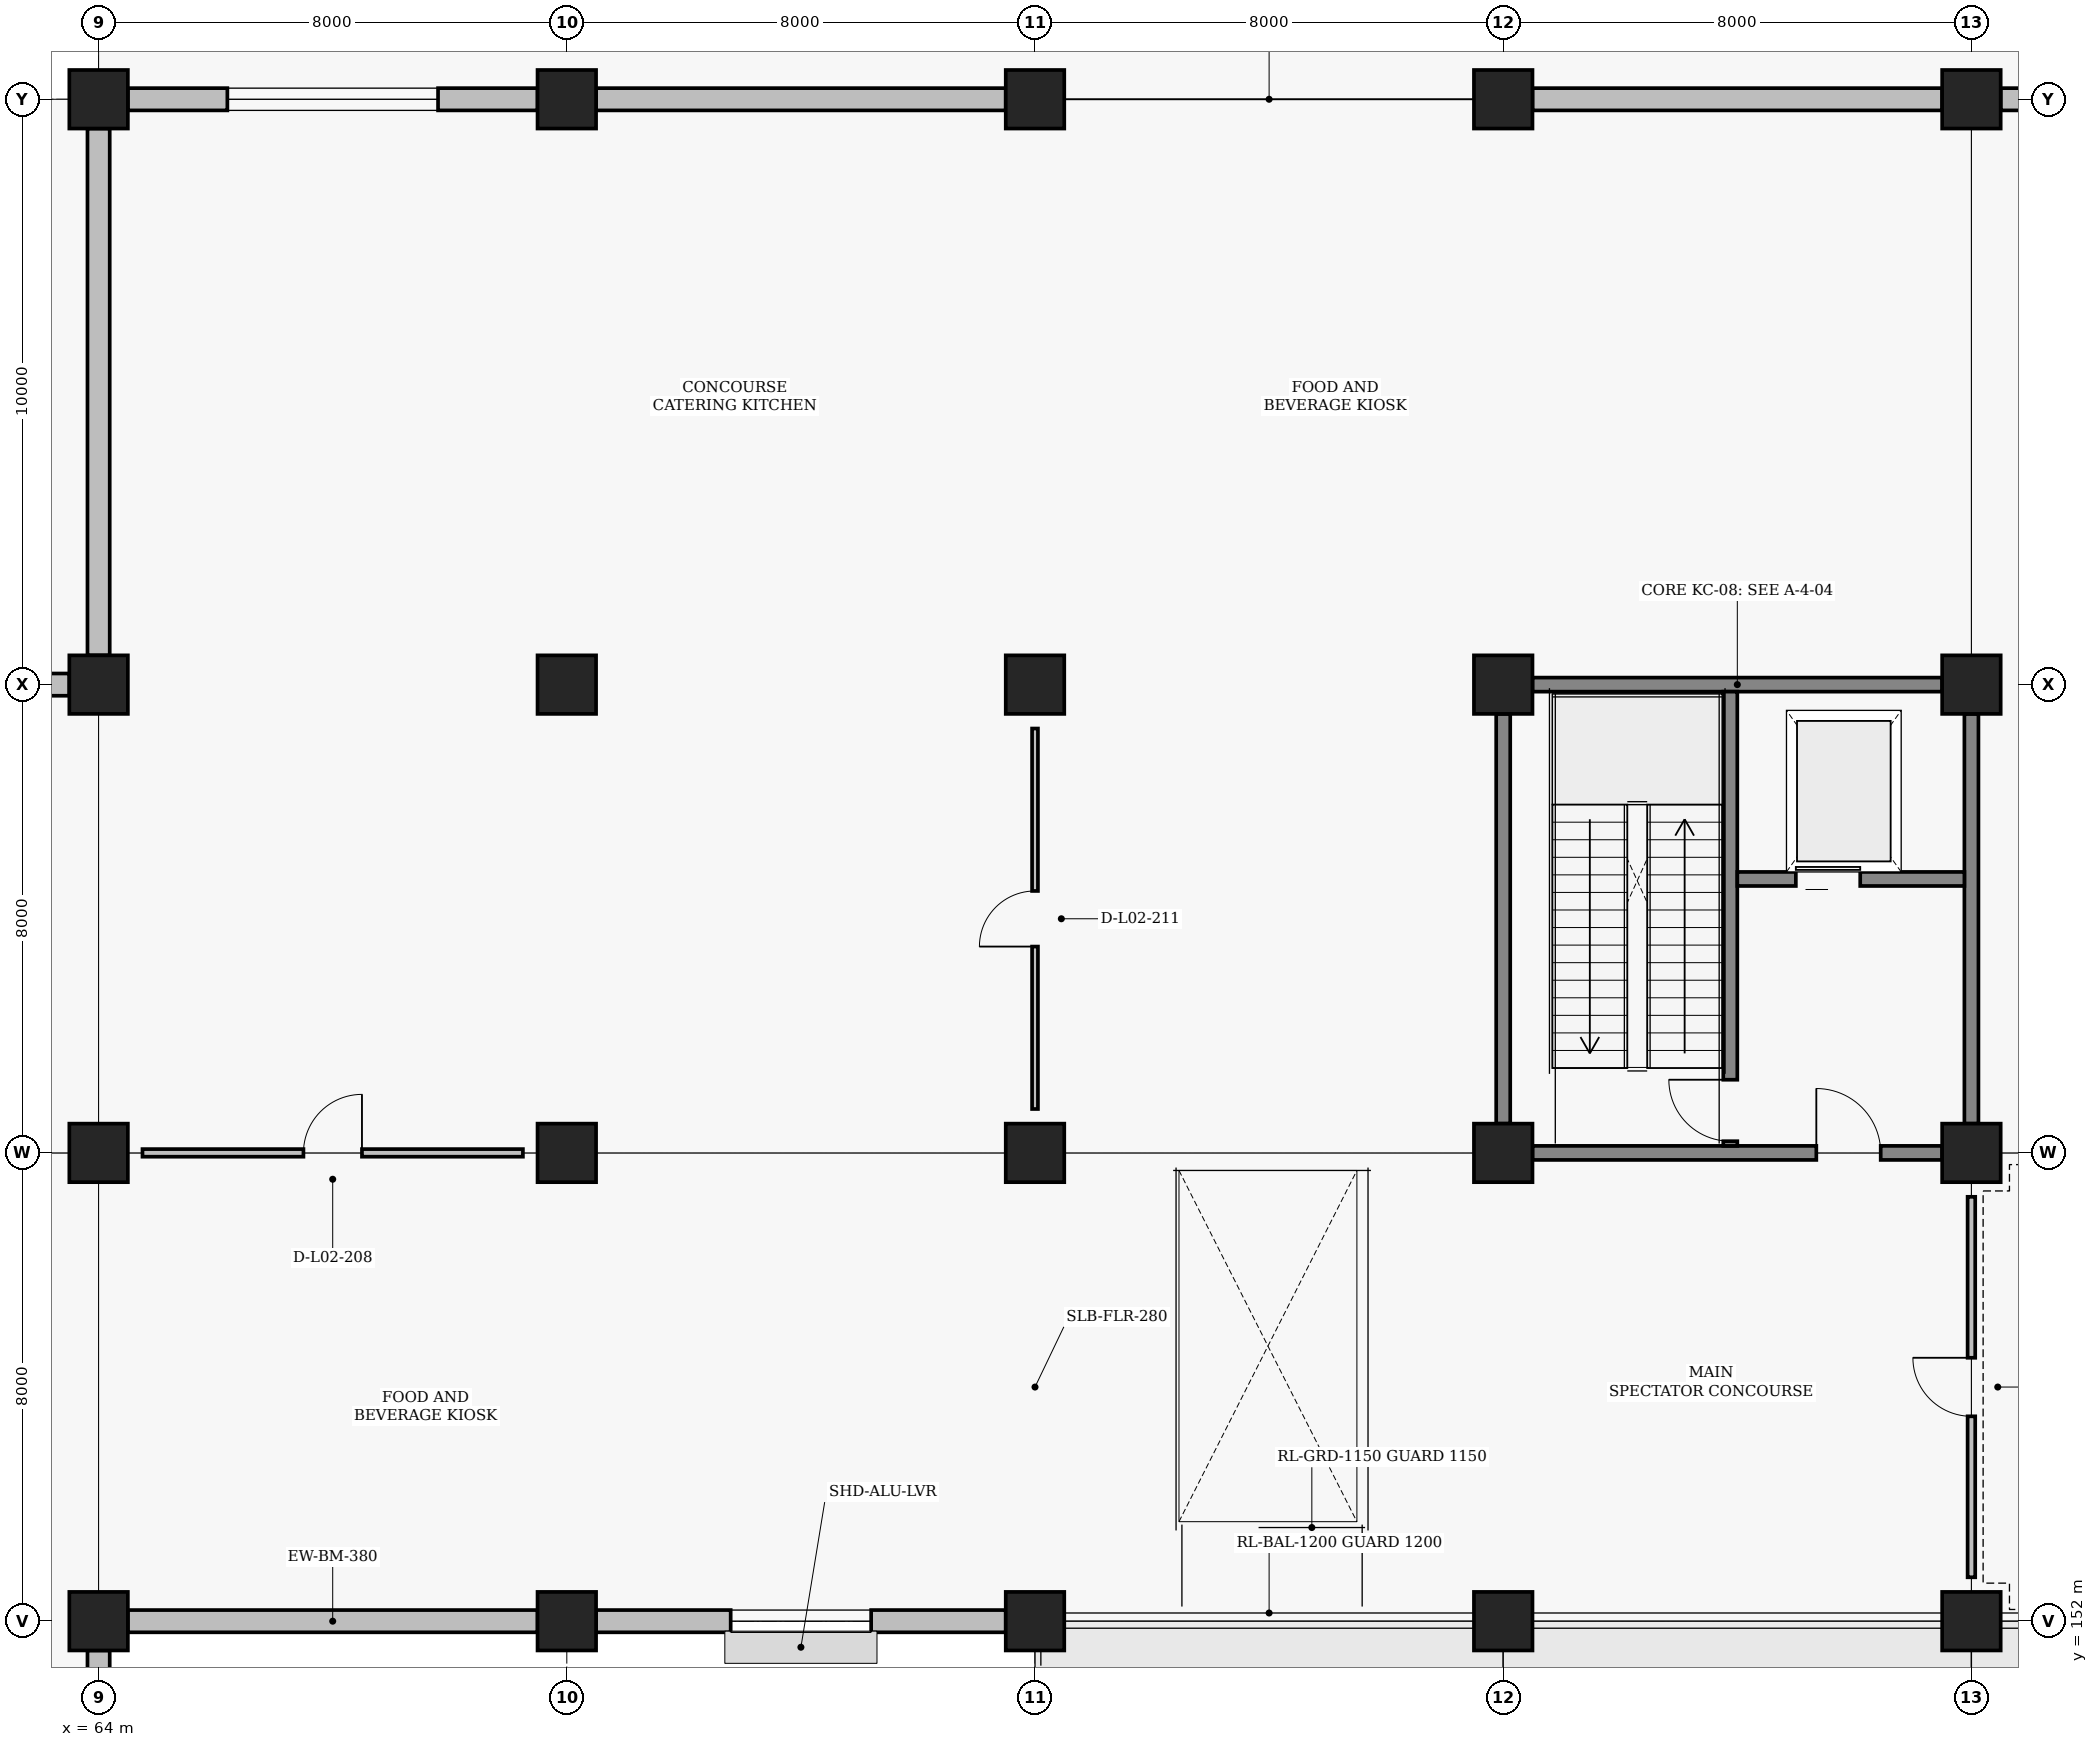
"""IFC4 building model, lengths in metres.
Left out: names, types, materials, properties, quantities, classifications, styles, units other than length and angle.
Written with IfcOpenShell. Run it as: python <this file> out.ifc"""

import sys

from ifc_helpers import new_model, si_unit, direction, frame, frame_2d, origin, origin_2d, place, context, subcontext, project, spatial, rectangle, extrude, element, fill, save


model = new_model("IFC4")
c1 = context("Model", 3, precision=1e-05, world=origin(), true_north=direction((0.0, 1.0)))
c2 = subcontext(c1, "Body", "Model", "MODEL_VIEW")
j1 = project(units=[si_unit("LENGTHUNIT", "METRE"), si_unit("PLANEANGLEUNIT", "RADIAN")], contexts=[c1])
p1 = place(None, origin())
s1 = spatial("IfcSite", under=j1, at=p1, CompositionType="ELEMENT")
p2 = place(p1, origin())
s2 = spatial("IfcBuilding", under=s1, at=p2, CompositionType="ELEMENT")
p3 = place(p2, frame((0.0, 0.0, 4.8)))
s3 = spatial("IfcBuildingStorey", under=s2, at=p3, CompositionType="ELEMENT", Elevation=4.8)
for number, where, z_axis, x_axis in (
    (1, (64.0, 152.0, 0.0), (0.0, 0.0, 1.0), (1.0, 0.0, 0.0)),
    (2, (64.0, 160.0, 0.0), (0.0, 0.0, 1.0), (1.0, 0.0, 0.0)),
    (3, (64.0, 168.0, 0.0), (0.0, 0.0, 1.0), (1.0, 0.0, 0.0)),
    (4, (64.0, 178.0, 0.0), (0.0, 0.0, 1.0), (1.0, 0.0, 0.0)),
    (5, (72.0, 152.0, 0.0), (0.0, 0.0, 1.0), (1.0, 0.0, 0.0)),
    (6, (72.0, 160.0, 0.0), (0.0, 0.0, 1.0), (1.0, 0.0, 0.0)),
    (7, (72.0, 168.0, 0.0), (0.0, 0.0, 1.0), (1.0, 0.0, 0.0)),
    (8, (72.0, 178.0, 0.0), (0.0, 0.0, 1.0), (1.0, 0.0, 0.0)),
    (9, (80.0, 152.0, 0.0), (0.0, 0.0, 1.0), (1.0, 0.0, 0.0)),
    (10, (80.0, 160.0, 0.0), (0.0, 0.0, 1.0), (1.0, 0.0, 0.0)),
    (11, (80.0, 168.0, 0.0), (0.0, 0.0, 1.0), (1.0, 0.0, 0.0)),
    (12, (80.0, 178.0, 0.0), (0.0, 0.0, 1.0), (1.0, 0.0, 0.0)),
    (13, (88.0, 152.0, 0.0), (0.0, 0.0, 1.0), (1.0, 0.0, 0.0)),
    (14, (88.0, 160.0, 0.0), (0.0, 0.0, 1.0), (1.0, 0.0, 0.0)),
    (15, (88.0, 168.0, 0.0), (0.0, 0.0, 1.0), (1.0, 0.0, 0.0)),
    (16, (88.0, 178.0, 0.0), (0.0, 0.0, 1.0), (1.0, 0.0, 0.0)),
    (17, (96.0, 152.0, 0.0), (0.0, 0.0, 1.0), (1.0, 0.0, 0.0)),
    (18, (96.0, 160.0, 0.0), (0.0, 0.0, 1.0), (1.0, 0.0, 0.0)),
    (19, (96.0, 168.0, 0.0), (0.0, 0.0, 1.0), (1.0, 0.0, 0.0)),
    (20, (96.0, 178.0, 0.0), (0.0, 0.0, 1.0), (1.0, 0.0, 0.0)),
):
    element("IfcColumn", number, at=place(p3, frame(where, z_axis=z_axis, x_axis=x_axis)), inside=s3, PredefinedType="COLUMN", context=c2, shape_type="SweptSolid", body=[
        extrude(rectangle(XDim=1.0, YDim=1.0, at=origin_2d()), origin(), (0.0, 0.0, 1.0), 4.8),
    ])
p4 = place(p3, frame((64.0, 144.5, 0.0), z_axis=(0.0, 0.0, 1.0), x_axis=(0.0, 1.0, 0.0)))
e21 = element("IfcWall", 21, at=p4, inside=s3, PredefinedType="SOLIDWALL", context=c2, shape_type="SweptSolid", body=[
    extrude(rectangle(XDim=7.0, YDim=0.38, at=frame_2d((3.5, 0.0))), origin(), (0.0, 0.0, 1.0), 3.91),
])
p5 = place(p4, frame((1.925, 0.0, 0.95)))
e22 = element("IfcOpeningElement", 22, at=p5, cuts=e21, PredefinedType="OPENING", context=c2, shape_type="SweptSolid", body=[
    extrude(rectangle(XDim=3.15, YDim=2.15, at=frame_2d((1.575, 1.075))), frame((0.0, 0.2, 0.0), z_axis=(0.0, -1.0, 0.0), x_axis=(1.0, 0.0, 0.0)), (0.0, 0.0, 1.0), 0.4),
])
p6 = place(p3, frame((56.5, 168.0, 0.0), z_axis=(0.0, 0.0, 1.0), x_axis=(1.0, 0.0, 0.0)))
e23 = element("IfcWall", 23, at=p6, inside=s3, PredefinedType="SOLIDWALL", context=c2, shape_type="SweptSolid", body=[
    extrude(rectangle(XDim=7.0, YDim=0.38, at=frame_2d((3.5, 0.0))), origin(), (0.0, 0.0, 1.0), 3.91),
])
p7 = place(p6, frame((1.85, 0.0, 0.95)))
e24 = element("IfcOpeningElement", 24, at=p7, cuts=e23, PredefinedType="OPENING", context=c2, shape_type="SweptSolid", body=[
    extrude(rectangle(XDim=3.3, YDim=2.2, at=frame_2d((1.65, 1.1))), frame((0.0, 0.2, 0.0), z_axis=(0.0, -1.0, 0.0), x_axis=(1.0, 0.0, 0.0)), (0.0, 0.0, 1.0), 0.4),
])
p8 = place(p3, frame((64.5, 152.0, 0.0), z_axis=(0.0, 0.0, 1.0), x_axis=(1.0, 0.0, 0.0)))
e25 = element("IfcWall", 25, at=p8, inside=s3, PredefinedType="SOLIDWALL", context=c2, shape_type="SweptSolid", body=[
    extrude(rectangle(XDim=7.0, YDim=0.38, at=frame_2d((3.5, 0.0))), origin(), (0.0, 0.0, 1.0), 3.91),
])
p9 = place(p3, frame((64.5, 178.0, 0.0), z_axis=(0.0, 0.0, 1.0), x_axis=(1.0, 0.0, 0.0)))
e26 = element("IfcWall", 26, at=p9, inside=s3, PredefinedType="SOLIDWALL", context=c2, shape_type="SweptSolid", body=[
    extrude(rectangle(XDim=7.0, YDim=0.38, at=frame_2d((3.5, 0.0))), origin(), (0.0, 0.0, 1.0), 3.77),
])
p10 = place(p9, frame((1.7, 0.0, 0.95)))
e27 = element("IfcOpeningElement", 27, at=p10, cuts=e26, PredefinedType="OPENING", context=c2, shape_type="SweptSolid", body=[
    extrude(rectangle(XDim=3.6, YDim=2.2, at=frame_2d((1.8, 1.1))), frame((0.0, 0.2, 0.0), z_axis=(0.0, -1.0, 0.0), x_axis=(1.0, 0.0, 0.0)), (0.0, 0.0, 1.0), 0.4),
])
p11 = place(p3, frame((64.0, 168.5, 0.0), z_axis=(0.0, 0.0, 1.0), x_axis=(0.0, 1.0, 0.0)))
e28 = element("IfcWall", 28, at=p11, inside=s3, PredefinedType="SOLIDWALL", context=c2, shape_type="SweptSolid", body=[
    extrude(rectangle(XDim=9.0, YDim=0.38, at=frame_2d((4.5, 0.0))), origin(), (0.0, 0.0, 1.0), 3.91),
])
p12 = place(p3, frame((72.5, 152.0, 0.0), z_axis=(0.0, 0.0, 1.0), x_axis=(1.0, 0.0, 0.0)))
e29 = element("IfcWall", 29, at=p12, inside=s3, PredefinedType="SOLIDWALL", context=c2, shape_type="SweptSolid", body=[
    extrude(rectangle(XDim=7.0, YDim=0.38, at=frame_2d((3.5, 0.0))), origin(), (0.0, 0.0, 1.0), 3.91),
])
p13 = place(p12, frame((2.3, 0.0, 1.9)))
e30 = element("IfcOpeningElement", 30, at=p13, cuts=e29, PredefinedType="OPENING", context=c2, shape_type="SweptSolid", body=[
    extrude(rectangle(XDim=2.4, YDim=1.1, at=frame_2d((1.2, 0.55))), frame((0.0, 0.2, 0.0), z_axis=(0.0, -1.0, 0.0), x_axis=(1.0, 0.0, 0.0)), (0.0, 0.0, 1.0), 0.4),
])
for number, where, z_axis, x_axis in (
    (31, (72.5, 178.0, 0.0), (0.0, 0.0, 1.0), (1.0, 0.0, 0.0)),
    (32, (88.5, 178.0, 0.0), (0.0, 0.0, 1.0), (1.0, 0.0, 0.0)),
):
    element("IfcWall", number, at=place(p3, frame(where, z_axis=z_axis, x_axis=x_axis)), inside=s3, PredefinedType="SOLIDWALL", context=c2, shape_type="SweptSolid", body=[
        extrude(rectangle(XDim=7.0, YDim=0.38, at=frame_2d((3.5, 0.0))), origin(), (0.0, 0.0, 1.0), 3.77),
    ])
p14 = place(p3, frame((96.5, 178.0, 0.0), z_axis=(0.0, 0.0, 1.0), x_axis=(1.0, 0.0, 0.0)))
e33 = element("IfcWall", 33, at=p14, inside=s3, PredefinedType="SOLIDWALL", context=c2, shape_type="SweptSolid", body=[
    extrude(rectangle(XDim=7.0, YDim=0.38, at=frame_2d((3.5, 0.0))), origin(), (0.0, 0.0, 1.0), 3.77),
])
p15 = place(p14, frame((1.9, 0.0, 1.9)))
e34 = element("IfcOpeningElement", 34, at=p15, cuts=e33, PredefinedType="OPENING", context=c2, shape_type="SweptSolid", body=[
    extrude(rectangle(XDim=3.2, YDim=1.1, at=frame_2d((1.6, 0.55))), frame((0.0, 0.2, 0.0), z_axis=(0.0, -1.0, 0.0), x_axis=(1.0, 0.0, 0.0)), (0.0, 0.0, 1.0), 0.4),
])
p16 = place(p3, frame((88.5, 160.0, 0.0), z_axis=(0.0, 0.0, 1.0), x_axis=(1.0, 0.0, 0.0)))
e35 = element("IfcWall", 35, at=p16, inside=s3, PredefinedType="SHEAR", context=c2, shape_type="SweptSolid", body=[
    extrude(rectangle(XDim=7.0, YDim=0.24, at=frame_2d((3.5, 0.0))), origin(), (0.0, 0.0, 1.0), 3.61),
])
p17 = place(p16, frame((4.85, 0.0, 0.0)))
e36 = element("IfcOpeningElement", 36, at=p17, cuts=e35, PredefinedType="OPENING", context=c2, shape_type="SweptSolid", body=[
    extrude(rectangle(XDim=1.1, YDim=2.2, at=frame_2d((0.55, 1.1))), frame((0.0, 0.13, 0.0), z_axis=(0.0, -1.0, 0.0), x_axis=(1.0, 0.0, 0.0)), (0.0, 0.0, 1.0), 0.26),
])
p18 = place(p3, frame((88.5, 168.0, 0.0), z_axis=(0.0, 0.0, 1.0), x_axis=(1.0, 0.0, 0.0)))
e37 = element("IfcWall", 37, at=p18, inside=s3, PredefinedType="SHEAR", context=c2, shape_type="SweptSolid", body=[
    extrude(rectangle(XDim=7.0, YDim=0.24, at=frame_2d((3.5, 0.0))), origin(), (0.0, 0.0, 1.0), 3.77),
])
p19 = place(p3, frame((88.0, 160.5, 0.0), z_axis=(0.0, 0.0, 1.0), x_axis=(0.0, 1.0, 0.0)))
e38 = element("IfcWall", 38, at=p19, inside=s3, PredefinedType="SHEAR", context=c2, shape_type="SweptSolid", body=[
    extrude(rectangle(XDim=7.0, YDim=0.24, at=frame_2d((3.5, 0.0))), origin(), (0.0, 0.0, 1.0), 3.61),
])
p20 = place(p3, frame((96.0, 160.5, 0.0), z_axis=(0.0, 0.0, 1.0), x_axis=(0.0, 1.0, 0.0)))
e39 = element("IfcWall", 39, at=p20, inside=s3, PredefinedType="SHEAR", context=c2, shape_type="SweptSolid", body=[
    extrude(rectangle(XDim=7.0, YDim=0.24, at=frame_2d((3.5, 0.0))), origin(), (0.0, 0.0, 1.0), 3.77),
])
p21 = place(p3, frame((91.88, 160.12, 0.0), z_axis=(0.0, 0.0, 1.0), x_axis=(0.0, 1.0, 0.0)))
e40 = element("IfcWall", 40, at=p21, inside=s3, PredefinedType="SHEAR", context=c2, shape_type="SweptSolid", body=[
    extrude(rectangle(XDim=7.76, YDim=0.24, at=frame_2d((3.88, 0.0))), origin(), (0.0, 0.0, 1.0), 4.01),
])
p22 = place(p21, frame((0.08, 0.0, 0.0)))
e41 = element("IfcOpeningElement", 41, at=p22, cuts=e40, PredefinedType="OPENING", context=c2, shape_type="SweptSolid", body=[
    extrude(rectangle(XDim=1.05, YDim=2.15, at=frame_2d((0.525, 1.075))), frame((0.0, 0.13, 0.0), z_axis=(0.0, -1.0, 0.0), x_axis=(1.0, 0.0, 0.0)), (0.0, 0.0, 1.0), 0.26),
])
p23 = place(p3, frame((92.0, 164.68, 0.0), z_axis=(0.0, 0.0, 1.0), x_axis=(1.0, 0.0, 0.0)))
e42 = element("IfcWall", 42, at=p23, inside=s3, PredefinedType="SHEAR", context=c2, shape_type="SweptSolid", body=[
    extrude(rectangle(XDim=3.88, YDim=0.24, at=frame_2d((1.94, 0.0))), origin(), (0.0, 0.0, 1.0), 3.91),
])
p24 = place(p23, frame((1.0, 0.0, 0.0)))
e43 = element("IfcOpeningElement", 43, at=p24, cuts=e42, PredefinedType="OPENING", context=c2, shape_type="SweptSolid", body=[
    extrude(rectangle(XDim=1.1, YDim=2.15, at=frame_2d((0.55, 1.075))), frame((0.0, 0.13, 0.0), z_axis=(0.0, -1.0, 0.0), x_axis=(1.0, 0.0, 0.0)), (0.0, 0.0, 1.0), 0.26),
])
p25 = place(p3, frame((64.75, 160.0, 0.0), z_axis=(0.0, 0.0, 1.0), x_axis=(1.0, 0.0, 0.0)))
e44 = element("IfcWall", 44, at=p25, inside=s3, PredefinedType="PARTITIONING", context=c2, shape_type="SweptSolid", body=[
    extrude(rectangle(XDim=6.5, YDim=0.13, at=frame_2d((3.25, 0.0))), origin(), (0.0, 0.0, 1.0), 3.91),
])
p26 = place(p25, frame((2.75, 0.0, 0.0)))
e45 = element("IfcOpeningElement", 45, at=p26, cuts=e44, PredefinedType="OPENING", context=c2, shape_type="SweptSolid", body=[
    extrude(rectangle(XDim=1.0, YDim=2.1, at=frame_2d((0.5, 1.05))), frame((0.0, 0.075, 0.0), z_axis=(0.0, -1.0, 0.0), x_axis=(1.0, 0.0, 0.0)), (0.0, 0.0, 1.0), 0.15),
])
p27 = place(p3, frame((80.0, 160.75, 0.0), z_axis=(0.0, 0.0, 1.0), x_axis=(0.0, 1.0, 0.0)))
e46 = element("IfcWall", 46, at=p27, inside=s3, PredefinedType="PARTITIONING", context=c2, shape_type="SweptSolid", body=[
    extrude(rectangle(XDim=6.5, YDim=0.1, at=frame_2d((3.25, 0.0))), origin(), (0.0, 0.0, 1.0), 3.91),
])
p28 = place(p27, frame((2.775, 0.0, 0.0)))
e47 = element("IfcOpeningElement", 47, at=p28, cuts=e46, PredefinedType="OPENING", context=c2, shape_type="SweptSolid", body=[
    extrude(rectangle(XDim=0.95, YDim=2.1, at=frame_2d((0.475, 1.05))), frame((0.0, 0.06, 0.0), z_axis=(0.0, -1.0, 0.0), x_axis=(1.0, 0.0, 0.0)), (0.0, 0.0, 1.0), 0.12),
])
p29 = place(p3, frame((96.0, 152.75, 0.0), z_axis=(0.0, 0.0, 1.0), x_axis=(0.0, 1.0, 0.0)))
e48 = element("IfcWall", 48, at=p29, inside=s3, PredefinedType="PARTITIONING", context=c2, shape_type="SweptSolid", body=[
    extrude(rectangle(XDim=6.5, YDim=0.13, at=frame_2d((3.25, 0.0))), origin(), (0.0, 0.0, 1.0), 3.91),
])
p30 = place(p29, frame((2.75, 0.0, 0.0)))
e49 = element("IfcOpeningElement", 49, at=p30, cuts=e48, PredefinedType="OPENING", context=c2, shape_type="SweptSolid", body=[
    extrude(rectangle(XDim=1.0, YDim=2.1, at=frame_2d((0.5, 1.05))), frame((0.0, 0.075, 0.0), z_axis=(0.0, -1.0, 0.0), x_axis=(1.0, 0.0, 0.0)), (0.0, 0.0, 1.0), 0.15),
])
p31 = place(p10, origin())
e50 = element("IfcWindow", 50, at=p31, inside=s3, PartitioningType="SINGLE_PANEL", PredefinedType="WINDOW", context=c2, shape_type="SweptSolid", body=[
    extrude(rectangle(XDim=3.6, YDim=2.2, at=frame_2d((1.8, 1.1))), frame((0.0, 0.03, 0.0), z_axis=(0.0, -1.0, 0.0), x_axis=(1.0, 0.0, 0.0)), (0.0, 0.0, 1.0), 0.06),
])
fill(e27, e50)
p32 = place(p13, origin())
e51 = element("IfcWindow", 51, at=p32, inside=s3, PartitioningType="SINGLE_PANEL", PredefinedType="LIGHTDOME", context=c2, shape_type="SweptSolid", body=[
    extrude(rectangle(XDim=2.4, YDim=1.1, at=frame_2d((1.2, 0.55))), frame((0.0, 0.03, 0.0), z_axis=(0.0, -1.0, 0.0), x_axis=(1.0, 0.0, 0.0)), (0.0, 0.0, 1.0), 0.06),
])
fill(e30, e51)
p33 = place(p17, origin())
e52 = element("IfcDoor", 52, at=p33, inside=s3, OperationType="SINGLE_SWING_LEFT", PredefinedType="DOOR", context=c2, shape_type="SweptSolid", body=[
    extrude(rectangle(XDim=1.1, YDim=2.2, at=frame_2d((0.55, 1.1))), frame((0.0, 0.025, 0.0), z_axis=(0.0, -1.0, 0.0), x_axis=(1.0, 0.0, 0.0)), (0.0, 0.0, 1.0), 0.05),
])
fill(e36, e52)
p34 = place(p22, origin())
e53 = element("IfcDoor", 53, at=p34, inside=s3, OperationType="SINGLE_SWING_RIGHT", PredefinedType="DOOR", context=c2, shape_type="SweptSolid", body=[
    extrude(rectangle(XDim=1.05, YDim=2.15, at=frame_2d((0.525, 1.075))), frame((0.0, 0.025, 0.0), z_axis=(0.0, -1.0, 0.0), x_axis=(1.0, 0.0, 0.0)), (0.0, 0.0, 1.0), 0.05),
])
fill(e41, e53)
p35 = place(p24, origin())
e54 = element("IfcDoor", 54, at=p35, inside=s3, OperationType="SLIDING_TO_LEFT", PredefinedType="DOOR", context=c2, shape_type="SweptSolid", body=[
    extrude(rectangle(XDim=1.1, YDim=2.15, at=frame_2d((0.55, 1.075))), frame((0.0, 0.025, 0.0), z_axis=(0.0, -1.0, 0.0), x_axis=(1.0, 0.0, 0.0)), (0.0, 0.0, 1.0), 0.05),
])
fill(e43, e54)
p36 = place(p26, origin())
e55 = element("IfcDoor", 55, at=p36, inside=s3, OperationType="SINGLE_SWING_RIGHT", PredefinedType="DOOR", context=c2, shape_type="SweptSolid", body=[
    extrude(rectangle(XDim=1.0, YDim=2.1, at=frame_2d((0.5, 1.05))), frame((0.0, 0.025, 0.0), z_axis=(0.0, -1.0, 0.0), x_axis=(1.0, 0.0, 0.0)), (0.0, 0.0, 1.0), 0.05),
])
fill(e45, e55)
p37 = place(p28, origin())
e56 = element("IfcDoor", 56, at=p37, inside=s3, OperationType="SINGLE_SWING_LEFT", PredefinedType="DOOR", context=c2, shape_type="SweptSolid", body=[
    extrude(rectangle(XDim=0.95, YDim=2.1, at=frame_2d((0.475, 1.05))), frame((0.0, 0.025, 0.0), z_axis=(0.0, -1.0, 0.0), x_axis=(1.0, 0.0, 0.0)), (0.0, 0.0, 1.0), 0.05),
])
fill(e47, e56)
p38 = place(p30, origin())
e57 = element("IfcDoor", 57, at=p38, inside=s3, OperationType="SINGLE_SWING_RIGHT", PredefinedType="DOOR", context=c2, shape_type="SweptSolid", body=[
    extrude(rectangle(XDim=1.0, YDim=2.1, at=frame_2d((0.5, 1.05))), frame((0.0, 0.025, 0.0), z_axis=(0.0, -1.0, 0.0), x_axis=(1.0, 0.0, 0.0)), (0.0, 0.0, 1.0), 0.05),
])
fill(e49, e57)
save(model, sys.argv[1])
